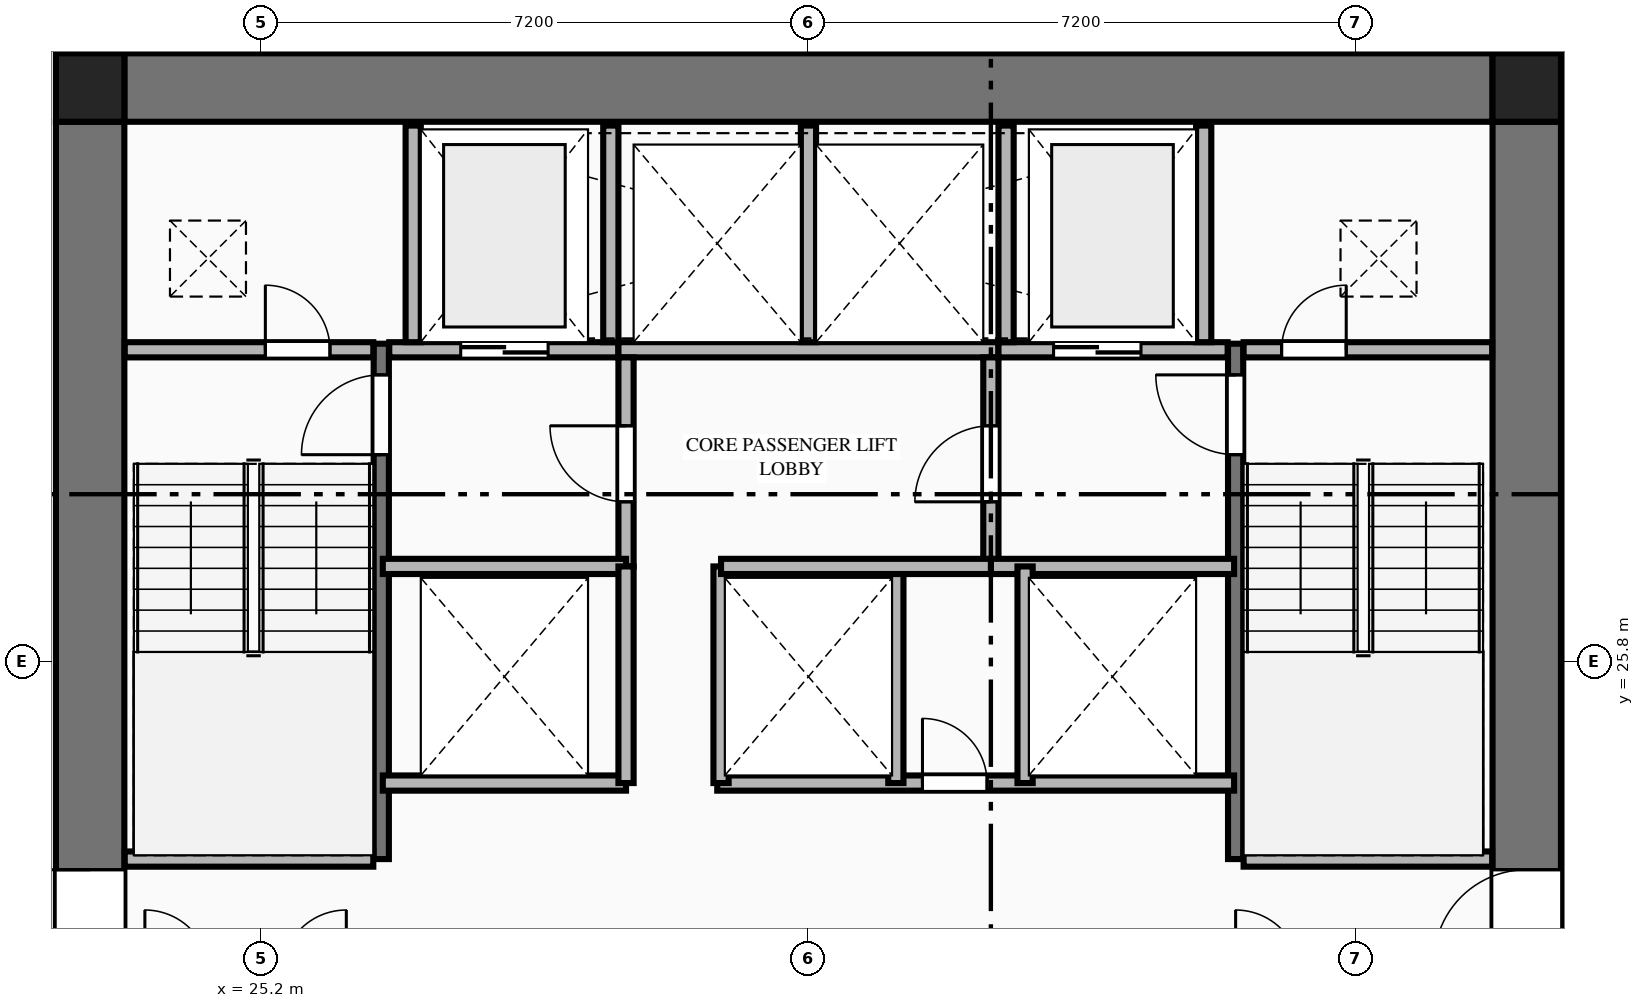
"""IFC4 building model, lengths in metres.
Left out: names, types, materials, properties, quantities, classifications, styles, units other than length and angle.
Written with IfcOpenShell. Run it as: python <this file> out.ifc"""

import sys

from ifc_helpers import new_model, si_unit, direction, frame, frame_2d, origin, origin_2d, place, context, subcontext, project, spatial, rectangle, extrude, element, fill, save


model = new_model("IFC4")
c1 = context("Model", 3, precision=1e-05, world=origin(), true_north=direction((0.0, 1.0)))
c2 = subcontext(c1, "Body", "Model", "MODEL_VIEW")
j1 = project(units=[si_unit("LENGTHUNIT", "METRE"), si_unit("PLANEANGLEUNIT", "RADIAN")], contexts=[c1])
p1 = place(None, origin())
s1 = spatial("IfcSite", under=j1, at=p1, CompositionType="ELEMENT")
p2 = place(p1, origin())
s2 = spatial("IfcBuilding", under=s1, at=p2, CompositionType="ELEMENT")
p3 = place(p2, frame((0.0, 0.0, 53.3)))
s3 = spatial("IfcBuildingStorey", under=s2, at=p3, CompositionType="ELEMENT", Elevation=53.3)
for number, where, z_axis, x_axis in (
    (1, (41.85, 33.35, 0.0), (0.0, 0.0, 1.0), (1.0, 0.0, 0.0)),
    (2, (22.95, 33.35, 0.0), (0.0, 0.0, 1.0), (1.0, 0.0, 0.0)),
):
    element("IfcColumn", number, at=place(p3, frame(where, z_axis=z_axis, x_axis=x_axis)), inside=s3, PredefinedType="COLUMN", context=c2, shape_type="SweptSolid", body=[
        extrude(rectangle(XDim=0.9, YDim=0.9, at=origin_2d()), origin(), (0.0, 0.0, 1.0), 3.55),
    ])
p4 = place(p3, frame((23.4, 33.35, 0.0), z_axis=(0.0, 0.0, 1.0), x_axis=(1.0, 0.0, 0.0)))
e3 = element("IfcWall", 3, at=p4, inside=s3, PredefinedType="SHEAR", context=c2, shape_type="SweptSolid", body=[
    extrude(rectangle(XDim=18.0, YDim=0.9, at=frame_2d((9.0, 0.0))), origin(), (0.0, 0.0, 1.0), 3.33),
])
p5 = place(p3, frame((22.95, 18.9, 0.0), z_axis=(0.0, 0.0, 1.0), x_axis=(0.0, 1.0, 0.0)))
e4 = element("IfcWall", 4, at=p5, inside=s3, PredefinedType="SHEAR", context=c2, shape_type="SweptSolid", body=[
    extrude(rectangle(XDim=14.0, YDim=0.9, at=frame_2d((7.0, 0.0))), origin(), (0.0, 0.0, 1.0), 3.33),
])
p6 = place(p5, frame((2.94, 0.0, 0.0)))
e5 = element("IfcOpeningElement", 5, at=p6, cuts=e4, PredefinedType="OPENING", context=c2, shape_type="SweptSolid", body=[
    extrude(rectangle(XDim=1.22, YDim=2.25, at=frame_2d((0.61, 1.125))), frame((0.0, 0.46, 0.0), z_axis=(0.0, -1.0, 0.0), x_axis=(1.0, 0.0, 0.0)), (0.0, 0.0, 1.0), 0.92),
])
p7 = place(p3, frame((41.85, 18.9, 0.0), z_axis=(0.0, 0.0, 1.0), x_axis=(0.0, 1.0, 0.0)))
e6 = element("IfcWall", 6, at=p7, inside=s3, PredefinedType="SHEAR", context=c2, shape_type="SweptSolid", body=[
    extrude(rectangle(XDim=14.0, YDim=0.9, at=frame_2d((7.0, 0.0))), origin(), (0.0, 0.0, 1.0), 3.33),
])
p8 = place(p7, frame((2.94, 0.0, 0.0)))
e7 = element("IfcOpeningElement", 7, at=p8, cuts=e6, PredefinedType="OPENING", context=c2, shape_type="SweptSolid", body=[
    extrude(rectangle(XDim=1.22, YDim=2.25, at=frame_2d((0.61, 1.125))), frame((0.0, 0.46, 0.0), z_axis=(0.0, -1.0, 0.0), x_axis=(1.0, 0.0, 0.0)), (0.0, 0.0, 1.0), 0.92),
])
p9 = place(p3, frame((26.78, 23.2, 0.0), z_axis=(0.0, 0.0, 1.0), x_axis=(0.0, 1.0, 0.0)))
e8 = element("IfcWall", 8, at=p9, inside=s3, PredefinedType="SHEAR", context=c2, shape_type="SweptSolid", body=[
    extrude(rectangle(XDim=6.78, YDim=0.2, at=frame_2d((3.39, 0.0))), origin(), (0.0, 0.0, 1.0), 3.55),
])
p10 = place(p9, frame((5.32, 0.0, 0.0)))
e9 = element("IfcOpeningElement", 9, at=p10, cuts=e8, PredefinedType="OPENING", context=c2, shape_type="SweptSolid", body=[
    extrude(rectangle(XDim=1.05, YDim=2.15, at=frame_2d((0.525, 1.075))), frame((0.0, 0.11, 0.0), z_axis=(0.0, -1.0, 0.0), x_axis=(1.0, 0.0, 0.0)), (0.0, 0.0, 1.0), 0.22),
])
p11 = place(p3, frame((23.405, 23.2, 0.0), z_axis=(0.0, 0.0, 1.0), x_axis=(1.0, 0.0, 0.0)))
e10 = element("IfcWall", 10, at=p11, inside=s3, PredefinedType="PLUMBINGWALL", context=c2, shape_type="SweptSolid", body=[
    extrude(rectangle(XDim=3.27, YDim=0.2, at=frame_2d((1.635, 0.0))), origin(), (0.0, 0.0, 1.0), 3.33),
])
p12 = place(p3, frame((38.02, 23.2, 0.0), z_axis=(0.0, 0.0, 1.0), x_axis=(0.0, 1.0, 0.0)))
e11 = element("IfcWall", 11, at=p12, inside=s3, PredefinedType="SHEAR", context=c2, shape_type="SweptSolid", body=[
    extrude(rectangle(XDim=6.78, YDim=0.2, at=frame_2d((3.39, 0.0))), origin(), (0.0, 0.0, 1.0), 3.55),
])
p13 = place(p12, frame((5.32, 0.0, 0.0)))
e12 = element("IfcOpeningElement", 12, at=p13, cuts=e11, PredefinedType="OPENING", context=c2, shape_type="SweptSolid", body=[
    extrude(rectangle(XDim=1.05, YDim=2.15, at=frame_2d((0.525, 1.075))), frame((0.0, 0.11, 0.0), z_axis=(0.0, -1.0, 0.0), x_axis=(1.0, 0.0, 0.0)), (0.0, 0.0, 1.0), 0.22),
])
p14 = place(p3, frame((38.125, 23.2, 0.0), z_axis=(0.0, 0.0, 1.0), x_axis=(1.0, 0.0, 0.0)))
e13 = element("IfcWall", 13, at=p14, inside=s3, PredefinedType="PLUMBINGWALL", context=c2, shape_type="SweptSolid", body=[
    extrude(rectangle(XDim=3.27, YDim=0.2, at=frame_2d((1.635, 0.0))), origin(), (0.0, 0.0, 1.0), 3.33),
])
p15 = place(p3, frame((23.405, 29.9, 0.0), z_axis=(0.0, 0.0, 1.0), x_axis=(1.0, 0.0, 0.0)))
e14 = element("IfcWall", 14, at=p15, inside=s3, PredefinedType="PLUMBINGWALL", context=c2, shape_type="SweptSolid", body=[
    extrude(rectangle(XDim=3.27, YDim=0.2, at=frame_2d((1.635, 0.0))), origin(), (0.0, 0.0, 1.0), 3.33),
])
p16 = place(p15, frame((1.85, 0.0, 0.0)))
e15 = element("IfcOpeningElement", 15, at=p16, cuts=e14, PredefinedType="OPENING", context=c2, shape_type="SweptSolid", body=[
    extrude(rectangle(XDim=0.85, YDim=2.05, at=frame_2d((0.425, 1.025))), frame((0.0, 0.11, 0.0), z_axis=(0.0, -1.0, 0.0), x_axis=(1.0, 0.0, 0.0)), (0.0, 0.0, 1.0), 0.22),
])
p17 = place(p3, frame((26.885, 29.9, 0.0), z_axis=(0.0, 0.0, 1.0), x_axis=(1.0, 0.0, 0.0)))
e16 = element("IfcWall", 16, at=p17, inside=s3, PredefinedType="PLUMBINGWALL", context=c2, shape_type="SweptSolid", body=[
    extrude(rectangle(XDim=3.015, YDim=0.2, at=frame_2d((1.507, 0.0))), origin(), (0.0, 0.0, 1.0), 3.33),
])
p18 = place(p17, frame((0.94, 0.0, 0.0)))
e17 = element("IfcOpeningElement", 17, at=p18, cuts=e16, PredefinedType="OPENING", context=c2, shape_type="SweptSolid", body=[
    extrude(rectangle(XDim=1.15, YDim=2.2, at=frame_2d((0.575, 1.1))), frame((0.0, 0.11, 0.0), z_axis=(0.0, -1.0, 0.0), x_axis=(1.0, 0.0, 0.0)), (0.0, 0.0, 1.0), 0.22),
])
p19 = place(p3, frame((29.9, 29.9, 0.0), z_axis=(0.0, 0.0, 1.0), x_axis=(1.0, 0.0, 0.0)))
e18 = element("IfcWall", 18, at=p19, inside=s3, PredefinedType="PLUMBINGWALL", context=c2, shape_type="SweptSolid", body=[
    extrude(rectangle(XDim=5.0, YDim=0.2, at=frame_2d((2.5, 0.0))), origin(), (0.0, 0.0, 1.0), 3.33),
])
p20 = place(p3, frame((34.9, 29.9, 0.0), z_axis=(0.0, 0.0, 1.0), x_axis=(1.0, 0.0, 0.0)))
e19 = element("IfcWall", 19, at=p20, inside=s3, PredefinedType="PLUMBINGWALL", context=c2, shape_type="SweptSolid", body=[
    extrude(rectangle(XDim=3.015, YDim=0.2, at=frame_2d((1.508, 0.0))), origin(), (0.0, 0.0, 1.0), 3.33),
])
p21 = place(p20, frame((0.725, 0.0, 0.0)))
e20 = element("IfcOpeningElement", 20, at=p21, cuts=e19, PredefinedType="OPENING", context=c2, shape_type="SweptSolid", body=[
    extrude(rectangle(XDim=1.15, YDim=2.2, at=frame_2d((0.575, 1.1))), frame((0.0, 0.11, 0.0), z_axis=(0.0, -1.0, 0.0), x_axis=(1.0, 0.0, 0.0)), (0.0, 0.0, 1.0), 0.22),
])
p22 = place(p3, frame((38.125, 29.9, 0.0), z_axis=(0.0, 0.0, 1.0), x_axis=(1.0, 0.0, 0.0)))
e21 = element("IfcWall", 21, at=p22, inside=s3, PredefinedType="PLUMBINGWALL", context=c2, shape_type="SweptSolid", body=[
    extrude(rectangle(XDim=3.27, YDim=0.2, at=frame_2d((1.635, 0.0))), origin(), (0.0, 0.0, 1.0), 3.33),
])
p23 = place(p22, frame((0.5, 0.0, 0.0)))
e22 = element("IfcOpeningElement", 22, at=p23, cuts=e21, PredefinedType="OPENING", context=c2, shape_type="SweptSolid", body=[
    extrude(rectangle(XDim=0.85, YDim=2.05, at=frame_2d((0.425, 1.025))), frame((0.0, 0.11, 0.0), z_axis=(0.0, -1.0, 0.0), x_axis=(1.0, 0.0, 0.0)), (0.0, 0.0, 1.0), 0.22),
])
for number, where, z_axis, x_axis in (
    (23, (27.2, 30.0, 0.0), (0.0, 0.0, 1.0), (0.0, 1.0, 0.0)),
    (24, (29.8, 30.0, 0.0), (0.0, 0.0, 1.0), (0.0, 1.0, 0.0)),
    (25, (32.4, 30.0, 0.0), (0.0, 0.0, 1.0), (0.0, 1.0, 0.0)),
    (26, (35.0, 30.0, 0.0), (0.0, 0.0, 1.0), (0.0, 1.0, 0.0)),
    (27, (37.6, 30.0, 0.0), (0.0, 0.0, 1.0), (0.0, 1.0, 0.0)),
):
    element("IfcWall", number, at=place(p3, frame(where, z_axis=z_axis, x_axis=x_axis)), inside=s3, PredefinedType="PLUMBINGWALL", context=c2, shape_type="SweptSolid", body=[
        extrude(rectangle(XDim=2.85, YDim=0.2, at=frame_2d((1.425, 0.0))), origin(), (0.0, 0.0, 1.0), 3.33),
    ])
p24 = place(p3, frame((30.0, 27.05, 0.0), z_axis=(0.0, 0.0, 1.0), x_axis=(0.0, 1.0, 0.0)))
e28 = element("IfcWall", 28, at=p24, inside=s3, PredefinedType="PLUMBINGWALL", context=c2, shape_type="SweptSolid", body=[
    extrude(rectangle(XDim=2.75, YDim=0.2, at=frame_2d((1.375, 0.0))), origin(), (0.0, 0.0, 1.0), 3.33),
])
p25 = place(p24, frame((0.85, 0.0, 0.0)))
e29 = element("IfcOpeningElement", 29, at=p25, cuts=e28, PredefinedType="OPENING", context=c2, shape_type="SweptSolid", body=[
    extrude(rectangle(XDim=1.0, YDim=2.15, at=frame_2d((0.5, 1.075))), frame((0.0, 0.11, 0.0), z_axis=(0.0, -1.0, 0.0), x_axis=(1.0, 0.0, 0.0)), (0.0, 0.0, 1.0), 0.22),
])
p26 = place(p3, frame((26.8, 27.05, 0.0), z_axis=(0.0, 0.0, 1.0), x_axis=(1.0, 0.0, 0.0)))
e30 = element("IfcWall", 30, at=p26, inside=s3, PredefinedType="PLUMBINGWALL", context=c2, shape_type="SweptSolid", body=[
    extrude(rectangle(XDim=3.2, YDim=0.2, at=frame_2d((1.6, 0.0))), origin(), (0.0, 0.0, 1.0), 3.33),
])
p27 = place(p3, frame((34.8, 27.05, 0.0), z_axis=(0.0, 0.0, 1.0), x_axis=(0.0, 1.0, 0.0)))
e31 = element("IfcWall", 31, at=p27, inside=s3, PredefinedType="PLUMBINGWALL", context=c2, shape_type="SweptSolid", body=[
    extrude(rectangle(XDim=2.75, YDim=0.2, at=frame_2d((1.375, 0.0))), origin(), (0.0, 0.0, 1.0), 3.33),
])
p28 = place(p27, frame((0.85, 0.0, 0.0)))
e32 = element("IfcOpeningElement", 32, at=p28, cuts=e31, PredefinedType="OPENING", context=c2, shape_type="SweptSolid", body=[
    extrude(rectangle(XDim=1.0, YDim=2.15, at=frame_2d((0.5, 1.075))), frame((0.0, 0.11, 0.0), z_axis=(0.0, -1.0, 0.0), x_axis=(1.0, 0.0, 0.0)), (0.0, 0.0, 1.0), 0.22),
])
for number, where, z_axis, x_axis in (
    (33, (34.8, 27.05, 0.0), (0.0, 0.0, 1.0), (1.0, 0.0, 0.0)),
    (34, (26.8, 24.2, 0.0), (0.0, 0.0, 1.0), (1.0, 0.0, 0.0)),
):
    element("IfcWall", number, at=place(p3, frame(where, z_axis=z_axis, x_axis=x_axis)), inside=s3, PredefinedType="PLUMBINGWALL", context=c2, shape_type="SweptSolid", body=[
        extrude(rectangle(XDim=3.2, YDim=0.2, at=frame_2d((1.6, 0.0))), origin(), (0.0, 0.0, 1.0), 3.33),
    ])
p29 = place(p3, frame((30.0, 24.2, 0.0), z_axis=(0.0, 0.0, 1.0), x_axis=(0.0, 1.0, 0.0)))
e35 = element("IfcWall", 35, at=p29, inside=s3, PredefinedType="PLUMBINGWALL", context=c2, shape_type="SweptSolid", body=[
    extrude(rectangle(XDim=2.85, YDim=0.2, at=frame_2d((1.425, 0.0))), origin(), (0.0, 0.0, 1.0), 3.33),
])
p30 = place(p3, frame((31.2, 24.2, 0.0), z_axis=(0.0, 0.0, 1.0), x_axis=(1.0, 0.0, 0.0)))
e36 = element("IfcWall", 36, at=p30, inside=s3, PredefinedType="PLUMBINGWALL", context=c2, shape_type="SweptSolid", body=[
    extrude(rectangle(XDim=6.8, YDim=0.2, at=frame_2d((3.4, 0.0))), origin(), (0.0, 0.0, 1.0), 3.33),
])
p31 = place(p30, frame((2.7, 0.0, 0.0)))
e37 = element("IfcOpeningElement", 37, at=p31, cuts=e36, PredefinedType="OPENING", context=c2, shape_type="SweptSolid", body=[
    extrude(rectangle(XDim=0.85, YDim=2.05, at=frame_2d((0.425, 1.025))), frame((0.0, 0.11, 0.0), z_axis=(0.0, -1.0, 0.0), x_axis=(1.0, 0.0, 0.0)), (0.0, 0.0, 1.0), 0.22),
])
for number, where, z_axis, x_axis in (
    (38, (31.25, 24.2, 0.0), (0.0, 0.0, 1.0), (0.0, 1.0, 0.0)),
    (39, (33.55, 24.2, 0.0), (0.0, 0.0, 1.0), (0.0, 1.0, 0.0)),
    (40, (35.25, 24.2, 0.0), (0.0, 0.0, 1.0), (0.0, 1.0, 0.0)),
):
    element("IfcWall", number, at=place(p3, frame(where, z_axis=z_axis, x_axis=x_axis)), inside=s3, PredefinedType="PLUMBINGWALL", context=c2, shape_type="SweptSolid", body=[
        extrude(rectangle(XDim=2.85, YDim=0.2, at=frame_2d((1.425, 0.0))), origin(), (0.0, 0.0, 1.0), 3.33),
    ])
p32 = place(p3, frame((31.25, 27.05, 0.0), z_axis=(0.0, 0.0, 1.0), x_axis=(1.0, 0.0, 0.0)))
e41 = element("IfcWall", 41, at=p32, inside=s3, PredefinedType="PLUMBINGWALL", context=c2, shape_type="SweptSolid", body=[
    extrude(rectangle(XDim=3.55, YDim=0.2, at=frame_2d((1.775, 0.0))), origin(), (0.0, 0.0, 1.0), 3.33),
])
p33 = place(p6, origin())
e42 = element("IfcDoor", 42, at=p33, inside=s3, OperationType="SINGLE_SWING_RIGHT", PredefinedType="DOOR", context=c2, shape_type="SweptSolid", body=[
    extrude(rectangle(XDim=1.22, YDim=2.25, at=frame_2d((0.61, 1.125))), frame((0.0, 0.025, 0.0), z_axis=(0.0, -1.0, 0.0), x_axis=(1.0, 0.0, 0.0)), (0.0, 0.0, 1.0), 0.05),
])
fill(e5, e42)
p34 = place(p8, origin())
e43 = element("IfcDoor", 43, at=p34, inside=s3, OperationType="SINGLE_SWING_LEFT", PredefinedType="DOOR", context=c2, shape_type="SweptSolid", body=[
    extrude(rectangle(XDim=1.22, YDim=2.25, at=frame_2d((0.61, 1.125))), frame((0.0, 0.025, 0.0), z_axis=(0.0, -1.0, 0.0), x_axis=(1.0, 0.0, 0.0)), (0.0, 0.0, 1.0), 0.05),
])
fill(e7, e43)
p35 = place(p10, origin())
e44 = element("IfcDoor", 44, at=p35, inside=s3, OperationType="SINGLE_SWING_LEFT", PredefinedType="DOOR", context=c2, shape_type="SweptSolid", body=[
    extrude(rectangle(XDim=1.05, YDim=2.15, at=frame_2d((0.525, 1.075))), frame((0.0, 0.025, 0.0), z_axis=(0.0, -1.0, 0.0), x_axis=(1.0, 0.0, 0.0)), (0.0, 0.0, 1.0), 0.05),
])
fill(e9, e44)
p36 = place(p13, origin())
e45 = element("IfcDoor", 45, at=p36, inside=s3, OperationType="SINGLE_SWING_RIGHT", PredefinedType="DOOR", context=c2, shape_type="SweptSolid", body=[
    extrude(rectangle(XDim=1.05, YDim=2.15, at=frame_2d((0.525, 1.075))), frame((0.0, 0.025, 0.0), z_axis=(0.0, -1.0, 0.0), x_axis=(1.0, 0.0, 0.0)), (0.0, 0.0, 1.0), 0.05),
])
fill(e12, e45)
p37 = place(p16, origin())
e46 = element("IfcDoor", 46, at=p37, inside=s3, OperationType="SINGLE_SWING_LEFT", PredefinedType="DOOR", context=c2, shape_type="SweptSolid", body=[
    extrude(rectangle(XDim=0.85, YDim=2.05, at=frame_2d((0.425, 1.025))), frame((0.0, 0.025, 0.0), z_axis=(0.0, -1.0, 0.0), x_axis=(1.0, 0.0, 0.0)), (0.0, 0.0, 1.0), 0.05),
])
fill(e15, e46)
p38 = place(p23, origin())
e47 = element("IfcDoor", 47, at=p38, inside=s3, OperationType="SINGLE_SWING_RIGHT", PredefinedType="DOOR", context=c2, shape_type="SweptSolid", body=[
    extrude(rectangle(XDim=0.85, YDim=2.05, at=frame_2d((0.425, 1.025))), frame((0.0, 0.025, 0.0), z_axis=(0.0, -1.0, 0.0), x_axis=(1.0, 0.0, 0.0)), (0.0, 0.0, 1.0), 0.05),
])
fill(e22, e47)
p39 = place(p18, origin())
e48 = element("IfcDoor", 48, at=p39, inside=s3, OperationType="DOUBLE_DOOR_SLIDING", PredefinedType="DOOR", context=c2, shape_type="SweptSolid", body=[
    extrude(rectangle(XDim=1.15, YDim=2.2, at=frame_2d((0.575, 1.1))), frame((0.0, 0.025, 0.0), z_axis=(0.0, -1.0, 0.0), x_axis=(1.0, 0.0, 0.0)), (0.0, 0.0, 1.0), 0.05),
])
fill(e17, e48)
p40 = place(p21, origin())
e49 = element("IfcDoor", 49, at=p40, inside=s3, OperationType="DOUBLE_DOOR_SLIDING", PredefinedType="DOOR", context=c2, shape_type="SweptSolid", body=[
    extrude(rectangle(XDim=1.15, YDim=2.2, at=frame_2d((0.575, 1.1))), frame((0.0, 0.025, 0.0), z_axis=(0.0, -1.0, 0.0), x_axis=(1.0, 0.0, 0.0)), (0.0, 0.0, 1.0), 0.05),
])
fill(e20, e49)
p41 = place(p25, origin())
e50 = element("IfcDoor", 50, at=p41, inside=s3, OperationType="SINGLE_SWING_RIGHT", PredefinedType="DOOR", context=c2, shape_type="SweptSolid", body=[
    extrude(rectangle(XDim=1.0, YDim=2.15, at=frame_2d((0.5, 1.075))), frame((0.0, 0.025, 0.0), z_axis=(0.0, -1.0, 0.0), x_axis=(1.0, 0.0, 0.0)), (0.0, 0.0, 1.0), 0.05),
])
fill(e29, e50)
p42 = place(p28, origin())
e51 = element("IfcDoor", 51, at=p42, inside=s3, OperationType="SINGLE_SWING_LEFT", PredefinedType="DOOR", context=c2, shape_type="SweptSolid", body=[
    extrude(rectangle(XDim=1.0, YDim=2.15, at=frame_2d((0.5, 1.075))), frame((0.0, 0.025, 0.0), z_axis=(0.0, -1.0, 0.0), x_axis=(1.0, 0.0, 0.0)), (0.0, 0.0, 1.0), 0.05),
])
fill(e32, e51)
p43 = place(p31, origin())
e52 = element("IfcDoor", 52, at=p43, inside=s3, OperationType="SINGLE_SWING_LEFT", PredefinedType="DOOR", context=c2, shape_type="SweptSolid", body=[
    extrude(rectangle(XDim=0.85, YDim=2.05, at=frame_2d((0.425, 1.025))), frame((0.0, 0.025, 0.0), z_axis=(0.0, -1.0, 0.0), x_axis=(1.0, 0.0, 0.0)), (0.0, 0.0, 1.0), 0.05),
])
fill(e37, e52)
save(model, sys.argv[1])
